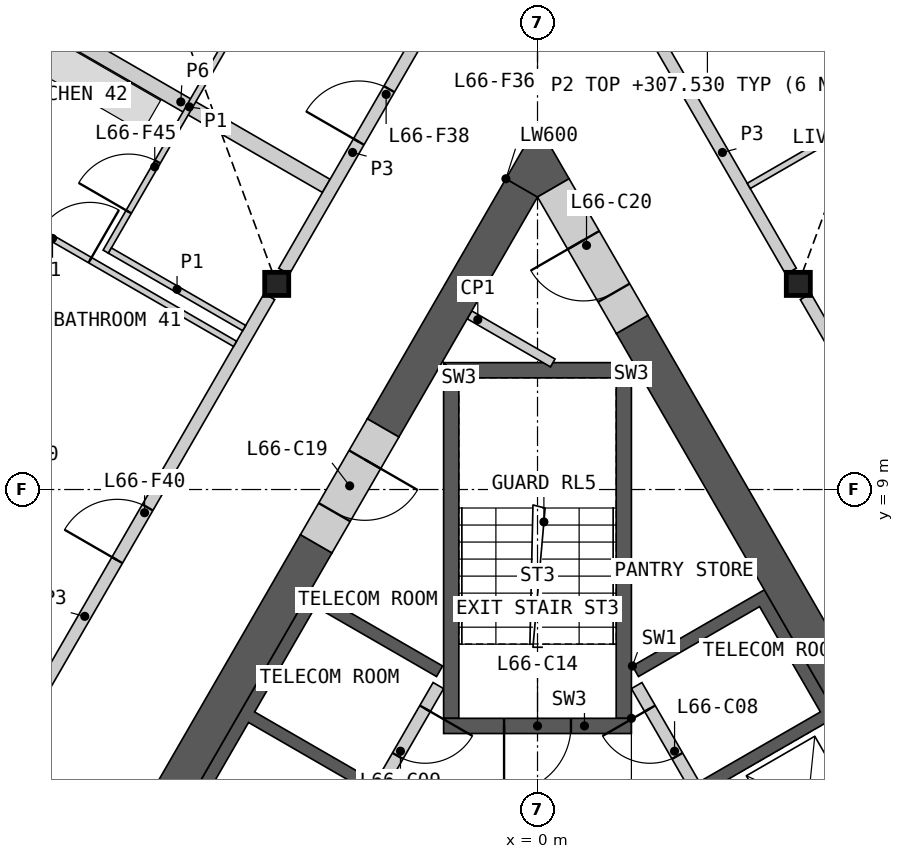
"""IFC4 building model, lengths in metres.
Left out: names, types, materials, properties, quantities, classifications, styles, units other than length and angle.
Written with IfcOpenShell. Run it as: python <this file> out.ifc"""

import sys

from ifc_helpers import new_model, si_unit, direction, frame, frame_2d, origin, origin_2d, place, context, subcontext, project, spatial, polyline, rectangle, i_section, outline, extrude, element, fill, save


model = new_model("IFC4")
c1 = context("Model", 3, precision=1e-05, world=origin(), true_north=direction((0.0, 1.0)))
c2 = subcontext(c1, "Body", "Model", "MODEL_VIEW")
j1 = project(units=[si_unit("LENGTHUNIT", "METRE"), si_unit("PLANEANGLEUNIT", "RADIAN")], contexts=[c1])
p1 = place(None, origin())
s1 = spatial("IfcSite", under=j1, at=p1, CompositionType="ELEMENT")
p2 = place(p1, origin())
s2 = spatial("IfcBuilding", under=s1, at=p2, CompositionType="ELEMENT")
p3 = place(p2, frame((0.0, 0.0, 305.2)))
s3 = spatial("IfcBuildingStorey", under=s2, at=p3, CompositionType="ELEMENT", Elevation=305.2)
for number, where, z_axis, x_axis in (
    (1, (-4.289, 12.382, 0.0), (0.0, 0.0, 1.0), (1.0, 0.0, 0.0)),
    (2, (4.289, 12.382, 0.0), (0.0, 0.0, 1.0), (1.0, 0.0, 0.0)),
):
    element("IfcColumn", number, at=place(p3, frame(where, z_axis=z_axis, x_axis=x_axis)), inside=s3, PredefinedType="COLUMN", context=c2, shape_type="SweptSolid", body=[
        extrude(i_section(OverallWidth=0.396, OverallDepth=0.381, WebThickness=0.019, FlangeThickness=0.03, at=origin_2d()), origin(), (0.0, 0.0, 1.0), 3.4),
    ])
p4 = place(p3, origin())
e3 = element("IfcWall", 3, at=p4, inside=s3, PredefinedType="SHEAR", context=c2, shape_type="SweptSolid", body=[
    extrude(outline(polyline([(1.561, 6.097), (3.731, 7.35), (8.231, -0.444), (6.061, -1.697), (5.96, -1.524), (7.952, -0.374), (6.952, 1.358), (4.96, 0.208), (4.861, 0.381), (6.852, 1.531), (5.852, 3.263), (3.861, 2.113), (3.76, 2.287), (5.752, 3.437), (4.752, 5.169), (2.76, 4.019), (2.66, 4.192), (4.652, 5.342), (3.652, 7.074), (1.66, 5.924), (1.561, 6.097)])), origin(), (0.0, 0.0, 1.0), 3.1),
])
p5 = place(p3, frame((5.817, -1.476, 0.0), z_axis=(0.0, 0.0, 1.0), x_axis=(-0.500002616675, 0.866023893041, 0.0)))
e4 = element("IfcWall", 4, at=p5, inside=s3, PredefinedType="SOLIDWALL", context=c2, shape_type="SweptSolid", body=[
    extrude(rectangle(XDim=8.373, YDim=0.2, at=frame_2d((4.187, 0.0))), origin(), (0.0, 0.0, 1.0), 3.1),
])
p6 = place(p5, frame((0.337, 0.0, 0.0)))
e5 = element("IfcOpeningElement", 5, at=p6, cuts=e4, PredefinedType="OPENING", context=c2, shape_type="SweptSolid", body=[
    extrude(rectangle(XDim=1.1, YDim=2.1, at=frame_2d((0.55, 1.05))), frame((0.0, 0.11, 0.0), z_axis=(0.0, -1.0, 0.0), x_axis=(1.0, 0.0, 0.0)), (0.0, 0.0, 1.0), 0.22),
])
p7 = place(p5, frame((2.537, 0.0, 0.0)))
e6 = element("IfcOpeningElement", 6, at=p7, cuts=e4, PredefinedType="OPENING", context=c2, shape_type="SweptSolid", body=[
    extrude(rectangle(XDim=1.1, YDim=2.1, at=frame_2d((0.55, 1.05))), frame((0.0, 0.11, 0.0), z_axis=(0.0, -1.0, 0.0), x_axis=(1.0, 0.0, 0.0)), (0.0, 0.0, 1.0), 0.22),
])
p8 = place(p5, frame((4.737, 0.0, 0.0)))
e7 = element("IfcOpeningElement", 7, at=p8, cuts=e4, PredefinedType="OPENING", context=c2, shape_type="SweptSolid", body=[
    extrude(rectangle(XDim=1.1, YDim=2.1, at=frame_2d((0.55, 1.05))), frame((0.0, 0.11, 0.0), z_axis=(0.0, -1.0, 0.0), x_axis=(1.0, 0.0, 0.0)), (0.0, 0.0, 1.0), 0.22),
])
p9 = place(p5, frame((7.037, 0.0, 0.0)))
e8 = element("IfcOpeningElement", 8, at=p9, cuts=e4, PredefinedType="OPENING", context=c2, shape_type="SweptSolid", body=[
    extrude(rectangle(XDim=0.9, YDim=2.1, at=frame_2d((0.45, 1.05))), frame((0.0, 0.11, 0.0), z_axis=(0.0, -1.0, 0.0), x_axis=(1.0, 0.0, 0.0)), (0.0, 0.0, 1.0), 0.22),
])
p10 = place(p3, origin())
e9 = element("IfcWall", 9, at=p10, inside=s3, PredefinedType="SHEAR", context=c2, shape_type="SweptSolid", body=[
    extrude(outline(polyline([(-4.96, 0.208), (-7.131, 1.461), (-3.731, 7.35), (-1.561, 6.097), (-1.66, 5.924), (-3.652, 7.074), (-4.652, 5.342), (-2.66, 4.192), (-2.76, 4.019), (-4.752, 5.169), (-6.852, 1.531), (-4.861, 0.381), (-4.96, 0.208)])), origin(), (0.0, 0.0, 1.0), 3.1),
])
p11 = place(p3, frame((-1.631, 5.776, 0.0), z_axis=(0.0, 0.0, 1.0), x_axis=(-0.499992876559, -0.866029516466, 0.0)))
e10 = element("IfcWall", 10, at=p11, inside=s3, PredefinedType="SOLIDWALL", context=c2, shape_type="SweptSolid", body=[
    extrude(rectangle(XDim=6.486, YDim=0.2, at=frame_2d((3.243, 0.0))), origin(), (0.0, 0.0, 1.0), 3.1),
])
p12 = place(p11, frame((0.437, 0.0, 0.0)))
e11 = element("IfcOpeningElement", 11, at=p12, cuts=e10, PredefinedType="OPENING", context=c2, shape_type="SweptSolid", body=[
    extrude(rectangle(XDim=0.9, YDim=2.1, at=frame_2d((0.45, 1.05))), frame((0.0, 0.11, 0.0), z_axis=(0.0, -1.0, 0.0), x_axis=(1.0, 0.0, 0.0)), (0.0, 0.0, 1.0), 0.22),
])
p13 = place(p11, frame((3.737, 0.0, 0.0)))
e12 = element("IfcOpeningElement", 12, at=p13, cuts=e10, PredefinedType="OPENING", context=c2, shape_type="SweptSolid", body=[
    extrude(rectangle(XDim=0.9, YDim=2.1, at=frame_2d((0.45, 1.05))), frame((0.0, 0.11, 0.0), z_axis=(0.0, -1.0, 0.0), x_axis=(1.0, 0.0, 0.0)), (0.0, 0.0, 1.0), 0.22),
])
p14 = place(p3, origin())
e13 = element("IfcWall", 13, at=p14, inside=s3, PredefinedType="SHEAR", context=c2, shape_type="SweptSolid", body=[
    extrude(outline(polyline([(1.544, 5.237), (1.544, 11.087), (1.294, 10.837), (1.294, 5.237), (1.544, 5.237)])), origin(), (0.0, 0.0, 1.0), 3.1),
])
p15 = place(p3, origin())
e14 = element("IfcWall", 14, at=p15, inside=s3, PredefinedType="SHEAR", context=c2, shape_type="SweptSolid", body=[
    extrude(outline(polyline([(1.544, 11.087), (-1.544, 11.087), (-1.294, 10.837), (1.294, 10.837), (1.544, 11.087)])), origin(), (0.0, 0.0, 1.0), 3.1),
])
p16 = place(p3, origin())
e15 = element("IfcWall", 15, at=p16, inside=s3, PredefinedType="SHEAR", context=c2, shape_type="SweptSolid", body=[
    extrude(outline(polyline([(-1.294, 10.837), (-1.544, 11.087), (-1.544, 5.237), (-1.294, 5.237), (-1.294, 10.837)])), origin(), (0.0, 0.0, 1.0), 3.1),
])
p17 = place(p3, frame((1.544, 5.112, 0.0), z_axis=(0.0, 0.0, 1.0), x_axis=(-1.0, 0.0, 0.0)))
e16 = element("IfcWall", 16, at=p17, inside=s3, PredefinedType="SHEAR", context=c2, shape_type="SweptSolid", body=[
    extrude(rectangle(XDim=3.088, YDim=0.25, at=frame_2d((1.544, 0.0))), origin(), (0.0, 0.0, 1.0), 3.1),
])
p18 = place(p17, frame((0.994, 0.0, 0.0)))
e17 = element("IfcOpeningElement", 17, at=p18, cuts=e16, PredefinedType="OPENING", context=c2, shape_type="SweptSolid", body=[
    extrude(rectangle(XDim=1.1, YDim=2.1, at=frame_2d((0.55, 1.05))), frame((0.0, 0.135, 0.0), z_axis=(0.0, -1.0, 0.0), x_axis=(1.0, 0.0, 0.0)), (0.0, 0.0, 1.0), 0.27),
])
p19 = place(p3, frame((-1.119, 11.873, 0.0), z_axis=(0.0, 0.0, 1.0), x_axis=(0.865992812752, -0.500056445075, 0.0)))
e18 = element("IfcWall", 18, at=p19, inside=s3, PredefinedType="PARTITIONING", context=c2, shape_type="SweptSolid", body=[
    extrude(rectangle(XDim=1.582, YDim=0.15, at=frame_2d((0.791, 0.0))), origin(), (0.0, 0.0, 1.0), 3.1),
])
p20 = place(p3, frame((8.841, -0.902, 0.0), z_axis=(0.0, 0.0, 1.0), x_axis=(-0.499995618375, 0.866027933502, 0.0)))
e19 = element("IfcWall", 19, at=p20, inside=s3, PredefinedType="SHEAR", context=c2, shape_type="SweptSolid", body=[
    extrude(rectangle(XDim=14.571, YDim=0.6, at=frame_2d((7.285, 0.0))), origin(), (0.0, 0.0, 1.0), 3.1),
])
p21 = place(p3, frame((-3.639, 8.107, 0.0), z_axis=(0.0, 0.0, 1.0), x_axis=(-0.49999180351, -0.866030135978, 0.0)))
e20 = element("IfcWall", 20, at=p21, inside=s3, PredefinedType="SHEAR", context=c2, shape_type="SweptSolid", body=[
    extrude(rectangle(XDim=7.401, YDim=0.6, at=frame_2d((3.701, 0.0))), origin(), (0.0, 0.0, 1.0), 3.1),
])
p22 = place(p3, frame((-0.26, 13.961, 0.0), z_axis=(0.0, 0.0, 1.0), x_axis=(-0.499980485389, -0.866036670257, 0.0)))
e21 = element("IfcWall", 21, at=p22, inside=s3, PredefinedType="SHEAR", context=c2, shape_type="SweptSolid", body=[
    extrude(rectangle(XDim=4.559, YDim=0.6, at=frame_2d((2.28, 0.0))), origin(), (0.0, 0.0, 1.0), 3.1),
])
p23 = place(p3, origin())
e22 = element("IfcWall", 22, at=p23, inside=s3, PredefinedType="SHEAR", context=c2, shape_type="SweptSolid", body=[
    extrude(outline(polyline([(-0.52, 14.111), (0.0, 15.011), (0.52, 14.111), (0.0, 13.811), (-0.52, 14.111)])), origin(), (0.0, 0.0, 1.0), 3.1),
])
p24 = place(p3, frame((-2.539, 10.013, 0.0), z_axis=(0.0, 0.0, 1.0), x_axis=(-0.50002983664, -0.866008176907, 0.0)))
e23 = element("IfcWall", 23, at=p24, inside=s3, PredefinedType="SHEAR", context=c2, shape_type="SweptSolid", body=[
    extrude(rectangle(XDim=2.2, YDim=0.6, at=frame_2d((1.1, 0.0))), origin(), (0.0, 0.0, 1.0), 3.1),
])
p25 = place(p24, frame((0.6, 0.0, 0.0)))
e24 = element("IfcOpeningElement", 24, at=p25, cuts=e23, PredefinedType="OPENING", context=c2, shape_type="SweptSolid", body=[
    extrude(rectangle(XDim=1.0, YDim=2.1, at=frame_2d((0.5, 1.05))), frame((0.0, 0.31, 0.0), z_axis=(0.0, -1.0, 0.0), x_axis=(1.0, 0.0, 0.0)), (0.0, 0.0, 1.0), 0.62),
])
p26 = place(p3, frame((1.556, 11.716, 0.0), z_axis=(0.0, 0.0, 1.0), x_axis=(-0.500018667571, 0.866014625789, 0.0)))
e25 = element("IfcWall", 25, at=p26, inside=s3, PredefinedType="SHEAR", context=c2, shape_type="SweptSolid", body=[
    extrude(rectangle(XDim=2.592, YDim=0.6, at=frame_2d((1.296, 0.0))), origin(), (0.0, 0.0, 1.0), 3.1),
])
p27 = place(p26, frame((0.6, 0.0, 0.0)))
e26 = element("IfcOpeningElement", 26, at=p27, cuts=e25, PredefinedType="OPENING", context=c2, shape_type="SweptSolid", body=[
    extrude(rectangle(XDim=1.0, YDim=2.1, at=frame_2d((0.5, 1.05))), frame((0.0, 0.31, 0.0), z_axis=(0.0, -1.0, 0.0), x_axis=(1.0, 0.0, 0.0)), (0.0, 0.0, 1.0), 0.62),
])
p28 = place(p3, frame((4.409, 12.174, 0.0), z_axis=(0.0, 0.0, 1.0), x_axis=(0.499984266882, -0.866034487114, 0.0)))
e27 = element("IfcWall", 27, at=p28, inside=s3, PredefinedType="PARTITIONING", context=c2, shape_type="SweptSolid", body=[
    extrude(rectangle(XDim=8.099, YDim=0.2, at=frame_2d((4.049, 0.0))), origin(), (0.0, 0.0, 1.0), 3.1),
])
p29 = place(p28, frame((5.123, 0.0, 0.0)))
e28 = element("IfcOpeningElement", 28, at=p29, cuts=e27, PredefinedType="OPENING", context=c2, shape_type="SweptSolid", body=[
    extrude(rectangle(XDim=1.0, YDim=2.1, at=frame_2d((0.5, 1.05))), frame((0.0, 0.11, 0.0), z_axis=(0.0, -1.0, 0.0), x_axis=(1.0, 0.0, 0.0)), (0.0, 0.0, 1.0), 0.22),
])
p30 = place(p28, frame((1.164, 0.0, 0.0)))
e29 = element("IfcOpeningElement", 29, at=p30, cuts=e27, PredefinedType="OPENING", context=c2, shape_type="SweptSolid", body=[
    extrude(rectangle(XDim=1.0, YDim=2.1, at=frame_2d((0.5, 1.05))), frame((0.0, 0.11, 0.0), z_axis=(0.0, -1.0, 0.0), x_axis=(1.0, 0.0, 0.0)), (0.0, 0.0, 1.0), 0.22),
])
p31 = place(p3, frame((-8.458, 5.16, 0.0), z_axis=(0.0, 0.0, 1.0), x_axis=(0.499984266882, 0.866034487114, 0.0)))
e30 = element("IfcWall", 30, at=p31, inside=s3, PredefinedType="PARTITIONING", context=c2, shape_type="SweptSolid", body=[
    extrude(rectangle(XDim=8.099, YDim=0.2, at=frame_2d((4.049, 0.0))), origin(), (0.0, 0.0, 1.0), 3.1),
])
p32 = place(p31, frame((3.093, 0.0, 0.0)))
e31 = element("IfcOpeningElement", 31, at=p32, cuts=e30, PredefinedType="OPENING", context=c2, shape_type="SweptSolid", body=[
    extrude(rectangle(XDim=1.0, YDim=2.1, at=frame_2d((0.5, 1.05))), frame((0.0, 0.11, 0.0), z_axis=(0.0, -1.0, 0.0), x_axis=(1.0, 0.0, 0.0)), (0.0, 0.0, 1.0), 0.22),
])
p33 = place(p3, frame((-8.259, 16.756, 0.0), z_axis=(0.0, 0.0, 1.0), x_axis=(0.866023692682, -0.500002963705, 0.0)))
e32 = element("IfcWall", 32, at=p33, inside=s3, PredefinedType="PARTITIONING", context=c2, shape_type="SweptSolid", body=[
    extrude(rectangle(XDim=5.525, YDim=0.25, at=frame_2d((2.762, 0.0))), origin(), (0.0, 0.0, 1.0), 2.33),
])
p34 = place(p3, frame((1.913, 16.498, 0.0), z_axis=(0.0, 0.0, 1.0), x_axis=(0.499950370306, -0.866054055606, 0.0)))
e33 = element("IfcWall", 33, at=p34, inside=s3, PredefinedType="PARTITIONING", context=c2, shape_type="SweptSolid", body=[
    extrude(rectangle(XDim=4.513, YDim=0.2, at=frame_2d((2.256, 0.0))), origin(), (0.0, 0.0, 1.0), 3.1),
])
p35 = place(p3, frame((-4.169, 12.59, 0.0), z_axis=(0.0, 0.0, 1.0), x_axis=(0.499950370306, 0.866054055606, 0.0)))
e34 = element("IfcWall", 34, at=p35, inside=s3, PredefinedType="PARTITIONING", context=c2, shape_type="SweptSolid", body=[
    extrude(rectangle(XDim=4.513, YDim=0.2, at=frame_2d((2.256, 0.0))), origin(), (0.0, 0.0, 1.0), 3.1),
])
p36 = place(p35, frame((2.459, 0.0, 0.0)))
e35 = element("IfcOpeningElement", 35, at=p36, cuts=e34, PredefinedType="OPENING", context=c2, shape_type="SweptSolid", body=[
    extrude(rectangle(XDim=1.0, YDim=2.1, at=frame_2d((0.5, 1.05))), frame((0.0, 0.11, 0.0), z_axis=(0.0, -1.0, 0.0), x_axis=(1.0, 0.0, 0.0)), (0.0, 0.0, 1.0), 0.22),
])
p37 = place(p3, frame((3.474, 13.994, 0.0), z_axis=(0.0, 0.0, 1.0), x_axis=(0.866032424046, 0.499987840353, 0.0)))
e36 = element("IfcWall", 36, at=p37, inside=s3, PredefinedType="PARTITIONING", context=c2, shape_type="SweptSolid", body=[
    extrude(rectangle(XDim=12.635, YDim=0.1, at=frame_2d((6.317, 0.0))), origin(), (0.0, 0.0, 1.0), 2.33),
])
p38 = place(p37, frame((8.714, 0.0, 0.0)))
e37 = element("IfcOpeningElement", 37, at=p38, cuts=e36, PredefinedType="OPENING", context=c2, shape_type="SweptSolid", body=[
    extrude(rectangle(XDim=0.95, YDim=2.1, at=frame_2d((0.475, 1.05))), frame((0.0, 0.06, 0.0), z_axis=(0.0, -1.0, 0.0), x_axis=(1.0, 0.0, 0.0)), (0.0, 0.0, 1.0), 0.12),
])
p39 = place(p3, frame((-9.787, 14.174, 0.0), z_axis=(0.0, 0.0, 1.0), x_axis=(0.866031222068, -0.499989922303, 0.0)))
e38 = element("IfcWall", 38, at=p39, inside=s3, PredefinedType="PARTITIONING", context=c2, shape_type="SweptSolid", body=[
    extrude(rectangle(XDim=5.557, YDim=0.1, at=frame_2d((2.779, 0.0))), origin(), (0.0, 0.0, 1.0), 2.33),
])
p40 = place(p39, frame((1.853, 0.0, 0.0)))
e39 = element("IfcOpeningElement", 39, at=p40, cuts=e38, PredefinedType="OPENING", context=c2, shape_type="SweptSolid", body=[
    extrude(rectangle(XDim=0.95, YDim=2.1, at=frame_2d((0.475, 1.05))), frame((0.0, 0.06, 0.0), z_axis=(0.0, -1.0, 0.0), x_axis=(1.0, 0.0, 0.0)), (0.0, 0.0, 1.0), 0.12),
])
p41 = place(p3, frame((-7.101, 12.912, 0.0), z_axis=(0.0, 0.0, 1.0), x_axis=(0.499996545922, 0.866027397988, 0.0)))
e40 = element("IfcWall", 40, at=p41, inside=s3, PredefinedType="PARTITIONING", context=c2, shape_type="SweptSolid", body=[
    extrude(rectangle(XDim=5.5, YDim=0.1, at=frame_2d((2.75, 0.0))), origin(), (0.0, 0.0, 1.0), 2.33),
])
p42 = place(p41, frame((0.756, 0.0, 0.0)))
e41 = element("IfcOpeningElement", 41, at=p42, cuts=e40, PredefinedType="OPENING", context=c2, shape_type="SweptSolid", body=[
    extrude(rectangle(XDim=0.95, YDim=2.1, at=frame_2d((0.475, 1.05))), frame((0.0, 0.06, 0.0), z_axis=(0.0, -1.0, 0.0), x_axis=(1.0, 0.0, 0.0)), (0.0, 0.0, 1.0), 0.12),
])
p43 = place(p3, frame((-7.032, 12.93, 0.0), z_axis=(0.0, 0.0, 1.0), x_axis=(0.866030925526, -0.499990435942, 0.0)))
e42 = element("IfcWall", 42, at=p43, inside=s3, PredefinedType="PARTITIONING", context=c2, shape_type="SweptSolid", body=[
    extrude(rectangle(XDim=2.55, YDim=0.1, at=frame_2d((1.275, 0.0))), origin(), (0.0, 0.0, 1.0), 2.33),
])
p44 = place(p9, origin())
e43 = element("IfcDoor", 43, at=p44, inside=s3, OperationType="SINGLE_SWING_RIGHT", PredefinedType="DOOR", context=c2, shape_type="SweptSolid", body=[
    extrude(rectangle(XDim=0.9, YDim=2.1, at=frame_2d((0.45, 1.05))), frame((0.0, 0.025, 0.0), z_axis=(0.0, -1.0, 0.0), x_axis=(1.0, 0.0, 0.0)), (0.0, 0.0, 1.0), 0.05),
])
fill(e8, e43)
p45 = place(p12, origin())
e44 = element("IfcDoor", 44, at=p45, inside=s3, OperationType="SINGLE_SWING_LEFT", PredefinedType="DOOR", context=c2, shape_type="SweptSolid", body=[
    extrude(rectangle(XDim=0.9, YDim=2.1, at=frame_2d((0.45, 1.05))), frame((0.0, 0.025, 0.0), z_axis=(0.0, -1.0, 0.0), x_axis=(1.0, 0.0, 0.0)), (0.0, 0.0, 1.0), 0.05),
])
fill(e11, e44)
p46 = place(p18, origin())
e45 = element("IfcDoor", 45, at=p46, inside=s3, OperationType="SINGLE_SWING_RIGHT", PredefinedType="DOOR", context=c2, shape_type="SweptSolid", body=[
    extrude(rectangle(XDim=1.1, YDim=2.1, at=frame_2d((0.55, 1.05))), frame((0.0, 0.025, 0.0), z_axis=(0.0, -1.0, 0.0), x_axis=(1.0, 0.0, 0.0)), (0.0, 0.0, 1.0), 0.05),
])
fill(e17, e45)
p47 = place(p25, origin())
e46 = element("IfcDoor", 46, at=p47, inside=s3, OperationType="SINGLE_SWING_LEFT", PredefinedType="DOOR", context=c2, shape_type="SweptSolid", body=[
    extrude(rectangle(XDim=1.0, YDim=2.1, at=frame_2d((0.5, 1.05))), frame((0.0, 0.055, 0.0), z_axis=(0.0, -1.0, 0.0), x_axis=(1.0, 0.0, 0.0)), (0.0, 0.0, 1.0), 0.05),
])
fill(e24, e46)
p48 = place(p27, origin())
e47 = element("IfcDoor", 47, at=p48, inside=s3, OperationType="SINGLE_SWING_RIGHT", PredefinedType="DOOR", context=c2, shape_type="SweptSolid", body=[
    extrude(rectangle(XDim=1.0, YDim=2.1, at=frame_2d((0.5, 1.05))), frame((0.0, 0.055, 0.0), z_axis=(0.0, -1.0, 0.0), x_axis=(1.0, 0.0, 0.0)), (0.0, 0.0, 1.0), 0.05),
])
fill(e26, e47)
p49 = place(p36, origin())
e48 = element("IfcDoor", 48, at=p49, inside=s3, OperationType="SINGLE_SWING_LEFT", PredefinedType="DOOR", context=c2, shape_type="SweptSolid", body=[
    extrude(rectangle(XDim=1.0, YDim=2.1, at=frame_2d((0.5, 1.05))), frame((0.0, 0.025, 0.0), z_axis=(0.0, -1.0, 0.0), x_axis=(1.0, 0.0, 0.0)), (0.0, 0.0, 1.0), 0.05),
])
fill(e35, e48)
p50 = place(p32, origin())
e49 = element("IfcDoor", 49, at=p50, inside=s3, OperationType="SINGLE_SWING_LEFT", PredefinedType="DOOR", context=c2, shape_type="SweptSolid", body=[
    extrude(rectangle(XDim=1.0, YDim=2.1, at=frame_2d((0.5, 1.05))), frame((0.0, 0.025, 0.0), z_axis=(0.0, -1.0, 0.0), x_axis=(1.0, 0.0, 0.0)), (0.0, 0.0, 1.0), 0.05),
])
fill(e31, e49)
p51 = place(p40, origin())
e50 = element("IfcDoor", 50, at=p51, inside=s3, OperationType="SINGLE_SWING_RIGHT", PredefinedType="DOOR", context=c2, shape_type="SweptSolid", body=[
    extrude(rectangle(XDim=0.95, YDim=2.1, at=frame_2d((0.475, 1.05))), frame((0.0, 0.025, 0.0), z_axis=(0.0, -1.0, 0.0), x_axis=(1.0, 0.0, 0.0)), (0.0, 0.0, 1.0), 0.05),
])
fill(e39, e50)
p52 = place(p42, origin())
e51 = element("IfcDoor", 51, at=p52, inside=s3, OperationType="SINGLE_SWING_LEFT", PredefinedType="DOOR", context=c2, shape_type="SweptSolid", body=[
    extrude(rectangle(XDim=0.95, YDim=2.1, at=frame_2d((0.475, 1.05))), frame((0.0, 0.025, 0.0), z_axis=(0.0, -1.0, 0.0), x_axis=(1.0, 0.0, 0.0)), (0.0, 0.0, 1.0), 0.05),
])
fill(e41, e51)
save(model, sys.argv[1])
